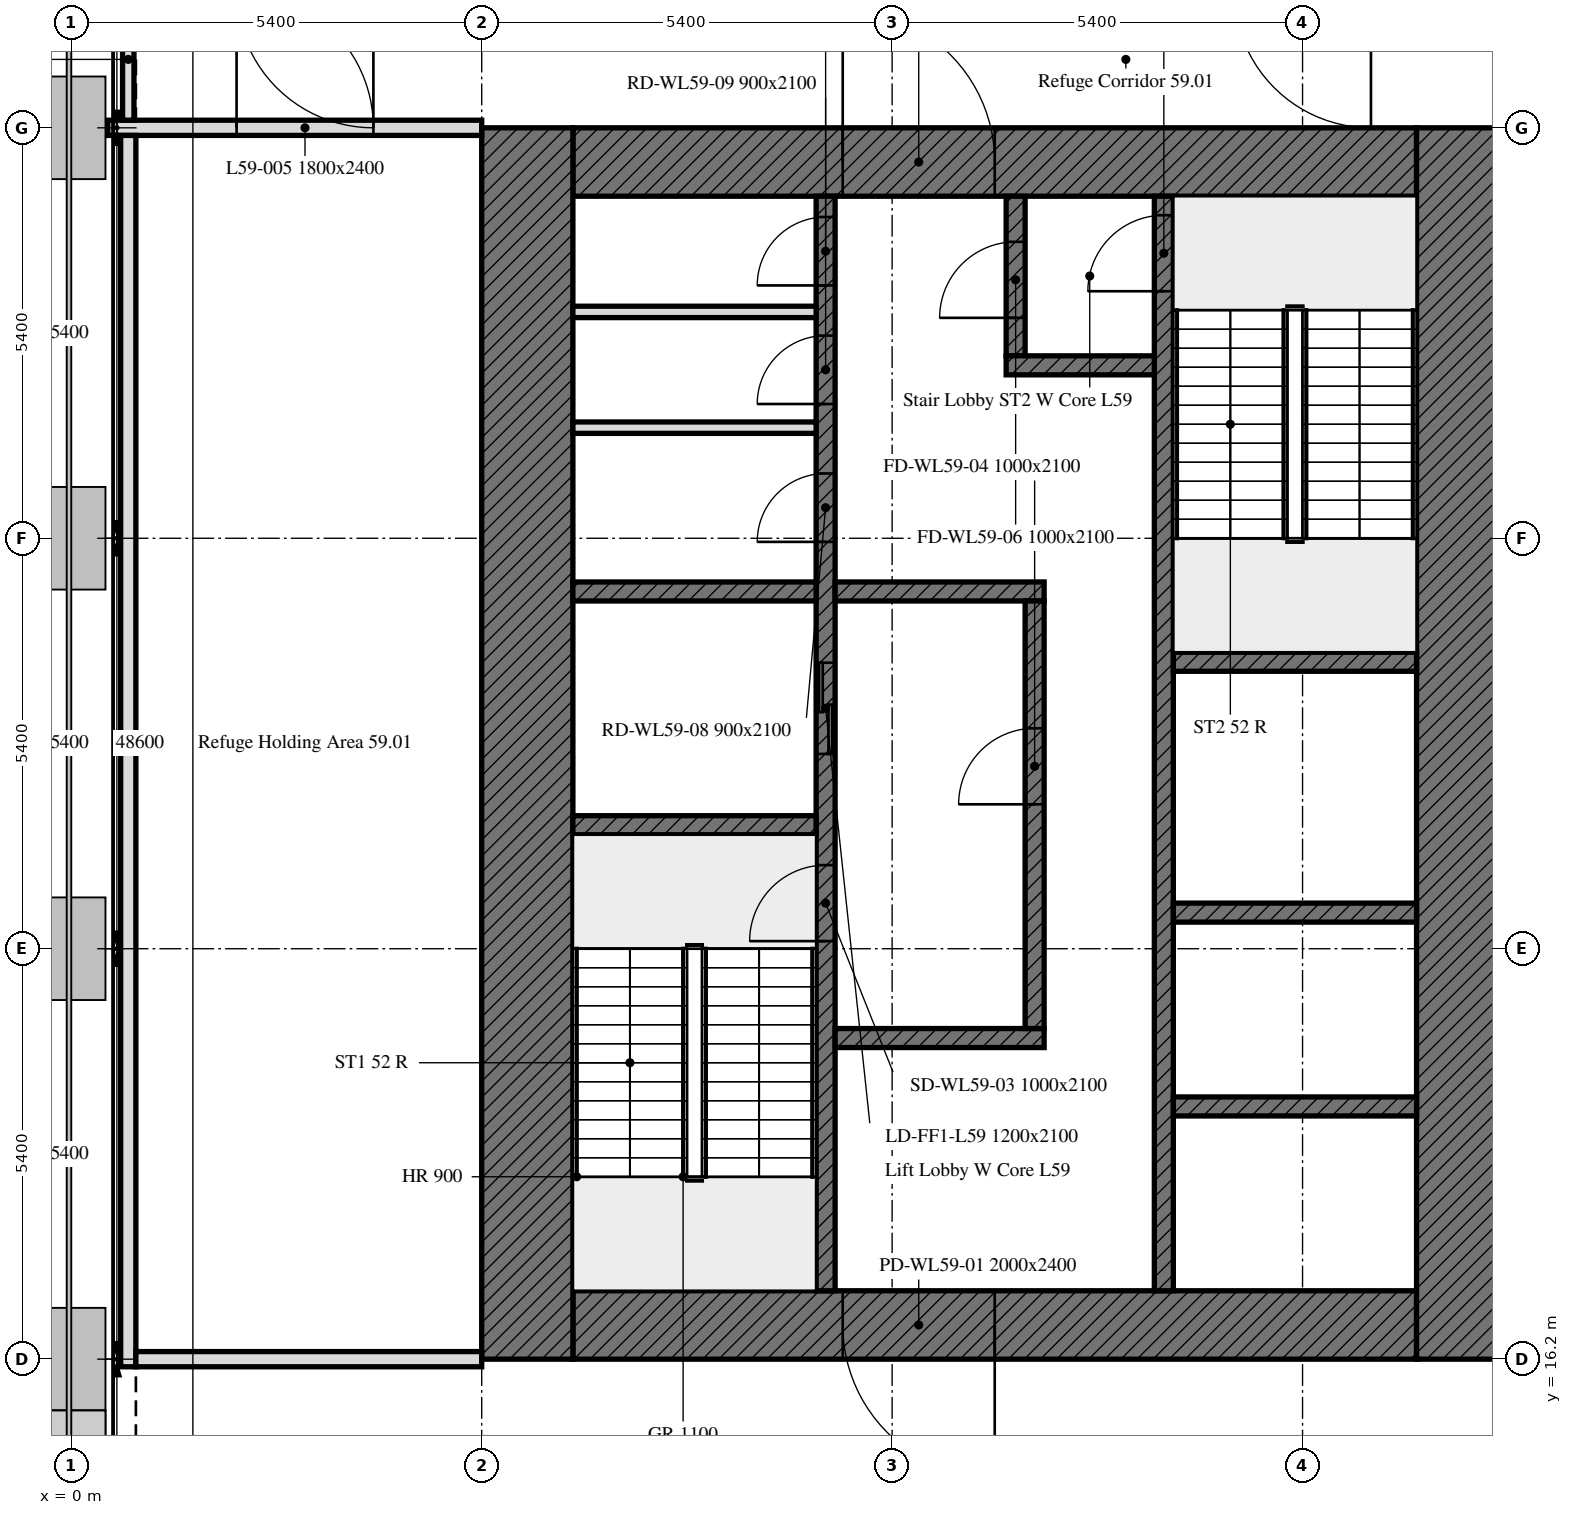
"""IFC4 building model, lengths in metres.
Left out: names, types, materials, properties, quantities, classifications, styles, units other than length and angle.
Written with IfcOpenShell. Run it as: python <this file> out.ifc"""

import sys

from ifc_helpers import new_model, si_unit, direction, frame, frame_2d, origin, place, context, subcontext, project, spatial, rectangle, extrude, element, fill, save


model = new_model("IFC4")
c1 = context("Model", 3, precision=1e-05, world=origin(), true_north=direction((0.0, 1.0)))
c2 = subcontext(c1, "Body", "Model", "MODEL_VIEW")
j1 = project(units=[si_unit("LENGTHUNIT", "METRE"), si_unit("PLANEANGLEUNIT", "RADIAN")], contexts=[c1])
p1 = place(None, origin())
s1 = spatial("IfcSite", under=j1, at=p1, CompositionType="ELEMENT")
p2 = place(p1, origin())
s2 = spatial("IfcBuilding", under=s1, at=p2, CompositionType="ELEMENT")
p3 = place(p2, frame((0.0, 0.0, 233.5)))
s3 = spatial("IfcBuildingStorey", under=s2, at=p3, CompositionType="ELEMENT", Elevation=233.5)
p4 = place(p3, frame((17.7, 16.65, 0.0), z_axis=(0.0, 0.0, 1.0), x_axis=(-1.0, 0.0, 0.0)))
e1 = element("IfcWall", 1, at=p4, inside=s3, PredefinedType="SOLIDWALL", context=c2, shape_type="SweptSolid", body=[
    extrude(rectangle(XDim=11.1, YDim=0.9, at=frame_2d((5.55, 0.0))), origin(), (0.0, 0.0, 1.0), 9.3),
])
p5 = place(p4, frame((5.55, 0.0, 0.0)))
e2 = element("IfcOpeningElement", 2, at=p5, cuts=e1, PredefinedType="OPENING", context=c2, shape_type="SweptSolid", body=[
    extrude(rectangle(XDim=2.0, YDim=2.4, at=frame_2d((1.0, 1.2))), frame((0.0, 0.45, 0.0), z_axis=(0.0, -1.0, 0.0), x_axis=(1.0, 0.0, 0.0)), (0.0, 0.0, 1.0), 0.9),
])
p6 = place(p3, frame((6.6, 31.95, 0.0), z_axis=(0.0, 0.0, 1.0), x_axis=(1.0, 0.0, 0.0)))
e3 = element("IfcWall", 3, at=p6, inside=s3, PredefinedType="SOLIDWALL", context=c2, shape_type="SweptSolid", body=[
    extrude(rectangle(XDim=11.1, YDim=0.9, at=frame_2d((5.55, 0.0))), origin(), (0.0, 0.0, 1.0), 9.3),
])
p7 = place(p6, frame((3.55, 0.0, 0.0)))
e4 = element("IfcOpeningElement", 4, at=p7, cuts=e3, PredefinedType="OPENING", context=c2, shape_type="SweptSolid", body=[
    extrude(rectangle(XDim=2.0, YDim=2.4, at=frame_2d((1.0, 1.2))), frame((0.0, 0.45, 0.0), z_axis=(0.0, -1.0, 0.0), x_axis=(1.0, 0.0, 0.0)), (0.0, 0.0, 1.0), 0.9),
])
for number, where, z_axis, x_axis in (
    (5, (6.0, 16.2, 0.0), (0.0, 0.0, 1.0), (0.0, 1.0, 0.0)),
    (6, (18.3, 32.4, 0.0), (0.0, 0.0, 1.0), (0.0, -1.0, 0.0)),
):
    element("IfcWall", number, at=place(p3, frame(where, z_axis=z_axis, x_axis=x_axis)), inside=s3, PredefinedType="SOLIDWALL", context=c2, shape_type="SweptSolid", body=[
        extrude(rectangle(XDim=16.2, YDim=1.2, at=frame_2d((8.1, 0.0))), origin(), (0.0, 0.0, 1.0), 9.3),
    ])
p8 = place(p3, frame((9.925, 17.1, 0.0), z_axis=(0.0, 0.0, 1.0), x_axis=(0.0, 1.0, 0.0)))
e7 = element("IfcWall", 7, at=p8, inside=s3, PredefinedType="SOLIDWALL", context=c2, shape_type="SweptSolid", body=[
    extrude(rectangle(XDim=14.4, YDim=0.25, at=frame_2d((7.2, 0.0))), origin(), (0.0, 0.0, 1.0), 9.3),
])
p9 = place(p8, frame((4.6, 0.0, 0.0)))
e8 = element("IfcOpeningElement", 8, at=p9, cuts=e7, PredefinedType="OPENING", context=c2, shape_type="SweptSolid", body=[
    extrude(rectangle(XDim=1.0, YDim=2.1, at=frame_2d((0.5, 1.05))), frame((0.0, 0.125, 0.0), z_axis=(0.0, -1.0, 0.0), x_axis=(1.0, 0.0, 0.0)), (0.0, 0.0, 1.0), 0.25),
])
p10 = place(p8, frame((7.062, 0.0, 0.0)))
e9 = element("IfcOpeningElement", 9, at=p10, cuts=e7, PredefinedType="OPENING", context=c2, shape_type="SweptSolid", body=[
    extrude(rectangle(XDim=1.2, YDim=2.1, at=frame_2d((0.6, 1.05))), frame((0.0, 0.125, 0.0), z_axis=(0.0, -1.0, 0.0), x_axis=(1.0, 0.0, 0.0)), (0.0, 0.0, 1.0), 0.25),
])
p11 = place(p8, frame((9.853, 0.0, 0.0)))
e10 = element("IfcOpeningElement", 10, at=p11, cuts=e7, PredefinedType="OPENING", context=c2, shape_type="SweptSolid", body=[
    extrude(rectangle(XDim=0.9, YDim=2.1, at=frame_2d((0.45, 1.05))), frame((0.0, 0.125, 0.0), z_axis=(0.0, -1.0, 0.0), x_axis=(1.0, 0.0, 0.0)), (0.0, 0.0, 1.0), 0.25),
])
p12 = place(p8, frame((11.667, 0.0, 0.0)))
e11 = element("IfcOpeningElement", 11, at=p12, cuts=e7, PredefinedType="OPENING", context=c2, shape_type="SweptSolid", body=[
    extrude(rectangle(XDim=0.9, YDim=2.1, at=frame_2d((0.45, 1.05))), frame((0.0, 0.125, 0.0), z_axis=(0.0, -1.0, 0.0), x_axis=(1.0, 0.0, 0.0)), (0.0, 0.0, 1.0), 0.25),
])
p13 = place(p8, frame((13.227, 0.0, 0.0)))
e12 = element("IfcOpeningElement", 12, at=p13, cuts=e7, PredefinedType="OPENING", context=c2, shape_type="SweptSolid", body=[
    extrude(rectangle(XDim=0.9, YDim=2.1, at=frame_2d((0.45, 1.05))), frame((0.0, 0.125, 0.0), z_axis=(0.0, -1.0, 0.0), x_axis=(1.0, 0.0, 0.0)), (0.0, 0.0, 1.0), 0.25),
])
p14 = place(p3, frame((14.375, 17.1, 0.0), z_axis=(0.0, 0.0, 1.0), x_axis=(0.0, 1.0, 0.0)))
e13 = element("IfcWall", 13, at=p14, inside=s3, PredefinedType="SOLIDWALL", context=c2, shape_type="SweptSolid", body=[
    extrude(rectangle(XDim=14.4, YDim=0.25, at=frame_2d((7.2, 0.0))), origin(), (0.0, 0.0, 1.0), 9.3),
])
p15 = place(p14, frame((13.15, 0.0, 0.0)))
e14 = element("IfcOpeningElement", 14, at=p15, cuts=e13, PredefinedType="OPENING", context=c2, shape_type="SweptSolid", body=[
    extrude(rectangle(XDim=1.0, YDim=2.1, at=frame_2d((0.5, 1.05))), frame((0.0, 0.125, 0.0), z_axis=(0.0, -1.0, 0.0), x_axis=(1.0, 0.0, 0.0)), (0.0, 0.0, 1.0), 0.25),
])
for number, where, z_axis, x_axis in (
    (15, (6.6, 23.225, 0.0), (0.0, 0.0, 1.0), (1.0, 0.0, 0.0)),
    (16, (14.5, 25.375, 0.0), (0.0, 0.0, 1.0), (1.0, 0.0, 0.0)),
    (17, (14.5, 22.075, 0.0), (0.0, 0.0, 1.0), (1.0, 0.0, 0.0)),
    (18, (6.6, 26.3, 0.0), (0.0, 0.0, 1.0), (1.0, 0.0, 0.0)),
):
    element("IfcWall", number, at=place(p3, frame(where, z_axis=z_axis, x_axis=x_axis)), inside=s3, PredefinedType="SOLIDWALL", context=c2, shape_type="SweptSolid", body=[
        extrude(rectangle(XDim=3.2, YDim=0.25, at=frame_2d((1.6, 0.0))), origin(), (0.0, 0.0, 1.0), 9.3),
    ])
for number, where, z_axis, x_axis in (
    (19, (10.05, 26.3, 0.0), (0.0, 0.0, 1.0), (1.0, 0.0, 0.0)),
    (20, (10.05, 20.425, 0.0), (0.0, 0.0, 1.0), (1.0, 0.0, 0.0)),
):
    element("IfcWall", number, at=place(p3, frame(where, z_axis=z_axis, x_axis=x_axis)), inside=s3, PredefinedType="SOLIDWALL", context=c2, shape_type="SweptSolid", body=[
        extrude(rectangle(XDim=2.75, YDim=0.25, at=frame_2d((1.375, 0.0))), origin(), (0.0, 0.0, 1.0), 9.3),
    ])
p16 = place(p3, frame((12.425, 29.4, 0.0), z_axis=(0.0, 0.0, 1.0), x_axis=(0.0, 1.0, 0.0)))
e21 = element("IfcWall", 21, at=p16, inside=s3, PredefinedType="SOLIDWALL", context=c2, shape_type="SweptSolid", body=[
    extrude(rectangle(XDim=2.1, YDim=0.25, at=frame_2d((1.05, 0.0))), origin(), (0.0, 0.0, 1.0), 9.3),
])
p17 = place(p16, frame((0.5, 0.0, 0.0)))
e22 = element("IfcOpeningElement", 22, at=p17, cuts=e21, PredefinedType="OPENING", context=c2, shape_type="SweptSolid", body=[
    extrude(rectangle(XDim=1.0, YDim=2.1, at=frame_2d((0.5, 1.05))), frame((0.0, 0.125, 0.0), z_axis=(0.0, -1.0, 0.0), x_axis=(1.0, 0.0, 0.0)), (0.0, 0.0, 1.0), 0.25),
])
p18 = place(p3, frame((12.3, 29.275, 0.0), z_axis=(0.0, 0.0, 1.0), x_axis=(1.0, 0.0, 0.0)))
e23 = element("IfcWall", 23, at=p18, inside=s3, PredefinedType="SOLIDWALL", context=c2, shape_type="SweptSolid", body=[
    extrude(rectangle(XDim=1.95, YDim=0.25, at=frame_2d((0.975, 0.0))), origin(), (0.0, 0.0, 1.0), 9.3),
])
p19 = place(p3, frame((12.675, 20.55, 0.0), z_axis=(0.0, 0.0, 1.0), x_axis=(0.0, 1.0, 0.0)))
e24 = element("IfcWall", 24, at=p19, inside=s3, PredefinedType="SOLIDWALL", context=c2, shape_type="SweptSolid", body=[
    extrude(rectangle(XDim=5.625, YDim=0.25, at=frame_2d((2.812, 0.0))), origin(), (0.0, 0.0, 1.0), 9.3),
])
p20 = place(p19, frame((2.95, 0.0, 0.0)))
e25 = element("IfcOpeningElement", 25, at=p20, cuts=e24, PredefinedType="OPENING", context=c2, shape_type="SweptSolid", body=[
    extrude(rectangle(XDim=1.0, YDim=2.1, at=frame_2d((0.5, 1.05))), frame((0.0, 0.125, 0.0), z_axis=(0.0, -1.0, 0.0), x_axis=(1.0, 0.0, 0.0)), (0.0, 0.0, 1.0), 0.25),
])
p21 = place(p3, frame((14.5, 19.525, 0.0), z_axis=(0.0, 0.0, 1.0), x_axis=(1.0, 0.0, 0.0)))
e26 = element("IfcWall", 26, at=p21, inside=s3, PredefinedType="SOLIDWALL", context=c2, shape_type="SweptSolid", body=[
    extrude(rectangle(XDim=3.2, YDim=0.25, at=frame_2d((1.6, 0.0))), origin(), (0.0, 0.0, 1.0), 9.3),
])
for number, where, z_axis, x_axis in (
    (27, (6.6, 28.455, 0.0), (0.0, 0.0, 1.0), (1.0, 0.0, 0.0)),
    (28, (6.6, 29.978, 0.0), (0.0, 0.0, 1.0), (1.0, 0.0, 0.0)),
):
    element("IfcWall", number, at=place(p3, frame(where, z_axis=z_axis, x_axis=x_axis)), inside=s3, PredefinedType="PARTITIONING", context=c2, shape_type="SweptSolid", body=[
        extrude(rectangle(XDim=3.2, YDim=0.15, at=frame_2d((1.6, 0.0))), origin(), (0.0, 0.0, 1.0), 9.3),
    ])
p22 = place(p3, frame((0.48, 32.4, 0.0), z_axis=(0.0, 0.0, 1.0), x_axis=(1.0, 0.0, 0.0)))
e29 = element("IfcWall", 29, at=p22, inside=s3, PredefinedType="PARTITIONING", context=c2, shape_type="SweptSolid", body=[
    extrude(rectangle(XDim=4.92, YDim=0.2, at=frame_2d((2.46, 0.0))), origin(), (0.0, 0.0, 1.0), 8.55),
])
p23 = place(p22, frame((1.695, 0.0, 0.0)))
e30 = element("IfcOpeningElement", 30, at=p23, cuts=e29, PredefinedType="OPENING", context=c2, shape_type="SweptSolid", body=[
    extrude(rectangle(XDim=1.8, YDim=2.4, at=frame_2d((0.9, 1.2))), frame((0.0, 0.1, 0.0), z_axis=(0.0, -1.0, 0.0), x_axis=(1.0, 0.0, 0.0)), (0.0, 0.0, 1.0), 0.2),
])
p24 = place(p3, frame((0.75, 34.1, 0.0), z_axis=(0.0, 0.0, 1.0), x_axis=(0.0, -1.0, 0.0)))
e31 = element("IfcWall", 31, at=p24, inside=s3, PredefinedType="PARTITIONING", context=c2, shape_type="SweptSolid", body=[
    extrude(rectangle(XDim=1.6, YDim=0.15, at=frame_2d((0.8, 0.0))), origin(), (0.0, 0.0, 1.0), 9.3),
])
p25 = place(p3, frame((0.75, 32.3, 0.0), z_axis=(0.0, 0.0, 1.0), x_axis=(0.0, -1.0, 0.0)))
e32 = element("IfcWall", 32, at=p25, inside=s3, PredefinedType="PARTITIONING", context=c2, shape_type="SweptSolid", body=[
    extrude(rectangle(XDim=16.2, YDim=0.2, at=frame_2d((8.1, 0.0))), origin(), (0.0, 0.0, 1.0), 9.3),
])
p26 = place(p3, frame((0.85, 16.2, 0.0), z_axis=(0.0, 0.0, 1.0), x_axis=(1.0, 0.0, 0.0)))
e33 = element("IfcWall", 33, at=p26, inside=s3, PredefinedType="PARTITIONING", context=c2, shape_type="SweptSolid", body=[
    extrude(rectangle(XDim=4.55, YDim=0.2, at=frame_2d((2.275, 0.0))), origin(), (0.0, 0.0, 1.0), 8.55),
])
p27 = place(p5, origin())
e34 = element("IfcDoor", 34, at=p27, inside=s3, OperationType="DOUBLE_DOOR_SINGLE_SWING", PredefinedType="DOOR", context=c2, shape_type="SweptSolid", body=[
    extrude(rectangle(XDim=2.0, YDim=2.4, at=frame_2d((1.0, 1.2))), frame((0.0, 0.025, 0.0), z_axis=(0.0, -1.0, 0.0), x_axis=(1.0, 0.0, 0.0)), (0.0, 0.0, 1.0), 0.05),
])
fill(e2, e34)
p28 = place(p7, origin())
e35 = element("IfcDoor", 35, at=p28, inside=s3, OperationType="DOUBLE_DOOR_SINGLE_SWING", PredefinedType="DOOR", context=c2, shape_type="SweptSolid", body=[
    extrude(rectangle(XDim=2.0, YDim=2.4, at=frame_2d((1.0, 1.2))), frame((0.0, 0.025, 0.0), z_axis=(0.0, -1.0, 0.0), x_axis=(1.0, 0.0, 0.0)), (0.0, 0.0, 1.0), 0.05),
])
fill(e4, e35)
p29 = place(p9, origin())
e36 = element("IfcDoor", 36, at=p29, inside=s3, OperationType="SINGLE_SWING_LEFT", PredefinedType="DOOR", context=c2, shape_type="SweptSolid", body=[
    extrude(rectangle(XDim=1.0, YDim=2.1, at=frame_2d((0.5, 1.05))), frame((0.0, 0.025, 0.0), z_axis=(0.0, -1.0, 0.0), x_axis=(1.0, 0.0, 0.0)), (0.0, 0.0, 1.0), 0.05),
])
fill(e8, e36)
p30 = place(p20, origin())
e37 = element("IfcDoor", 37, at=p30, inside=s3, OperationType="SINGLE_SWING_LEFT", PredefinedType="DOOR", context=c2, shape_type="SweptSolid", body=[
    extrude(rectangle(XDim=1.0, YDim=2.1, at=frame_2d((0.5, 1.05))), frame((0.0, 0.025, 0.0), z_axis=(0.0, -1.0, 0.0), x_axis=(1.0, 0.0, 0.0)), (0.0, 0.0, 1.0), 0.05),
])
fill(e25, e37)
p31 = place(p15, origin())
e38 = element("IfcDoor", 38, at=p31, inside=s3, OperationType="SINGLE_SWING_LEFT", PredefinedType="DOOR", context=c2, shape_type="SweptSolid", body=[
    extrude(rectangle(XDim=1.0, YDim=2.1, at=frame_2d((0.5, 1.05))), frame((0.0, 0.025, 0.0), z_axis=(0.0, -1.0, 0.0), x_axis=(1.0, 0.0, 0.0)), (0.0, 0.0, 1.0), 0.05),
])
fill(e14, e38)
p32 = place(p17, origin())
e39 = element("IfcDoor", 39, at=p32, inside=s3, OperationType="SINGLE_SWING_LEFT", PredefinedType="DOOR", context=c2, shape_type="SweptSolid", body=[
    extrude(rectangle(XDim=1.0, YDim=2.1, at=frame_2d((0.5, 1.05))), frame((0.0, 0.025, 0.0), z_axis=(0.0, -1.0, 0.0), x_axis=(1.0, 0.0, 0.0)), (0.0, 0.0, 1.0), 0.05),
])
fill(e22, e39)
p33 = place(p10, origin())
e40 = element("IfcDoor", 40, at=p33, inside=s3, OperationType="DOUBLE_DOOR_SLIDING", PredefinedType="DOOR", context=c2, shape_type="SweptSolid", body=[
    extrude(rectangle(XDim=1.2, YDim=2.1, at=frame_2d((0.6, 1.05))), frame((0.0, 0.025, 0.0), z_axis=(0.0, -1.0, 0.0), x_axis=(1.0, 0.0, 0.0)), (0.0, 0.0, 1.0), 0.05),
])
fill(e9, e40)
p34 = place(p11, origin())
e41 = element("IfcDoor", 41, at=p34, inside=s3, OperationType="SINGLE_SWING_LEFT", PredefinedType="DOOR", context=c2, shape_type="SweptSolid", body=[
    extrude(rectangle(XDim=0.9, YDim=2.1, at=frame_2d((0.45, 1.05))), frame((0.0, 0.025, 0.0), z_axis=(0.0, -1.0, 0.0), x_axis=(1.0, 0.0, 0.0)), (0.0, 0.0, 1.0), 0.05),
])
fill(e10, e41)
p35 = place(p12, origin())
e42 = element("IfcDoor", 42, at=p35, inside=s3, OperationType="SINGLE_SWING_LEFT", PredefinedType="DOOR", context=c2, shape_type="SweptSolid", body=[
    extrude(rectangle(XDim=0.9, YDim=2.1, at=frame_2d((0.45, 1.05))), frame((0.0, 0.025, 0.0), z_axis=(0.0, -1.0, 0.0), x_axis=(1.0, 0.0, 0.0)), (0.0, 0.0, 1.0), 0.05),
])
fill(e11, e42)
p36 = place(p13, origin())
e43 = element("IfcDoor", 43, at=p36, inside=s3, OperationType="SINGLE_SWING_LEFT", PredefinedType="DOOR", context=c2, shape_type="SweptSolid", body=[
    extrude(rectangle(XDim=0.9, YDim=2.1, at=frame_2d((0.45, 1.05))), frame((0.0, 0.025, 0.0), z_axis=(0.0, -1.0, 0.0), x_axis=(1.0, 0.0, 0.0)), (0.0, 0.0, 1.0), 0.05),
])
fill(e12, e43)
p37 = place(p23, origin())
e44 = element("IfcDoor", 44, at=p37, inside=s3, OperationType="DOUBLE_DOOR_SINGLE_SWING", PredefinedType="DOOR", context=c2, shape_type="SweptSolid", body=[
    extrude(rectangle(XDim=1.8, YDim=2.4, at=frame_2d((0.9, 1.2))), frame((0.0, 0.025, 0.0), z_axis=(0.0, -1.0, 0.0), x_axis=(1.0, 0.0, 0.0)), (0.0, 0.0, 1.0), 0.05),
])
fill(e30, e44)
save(model, sys.argv[1])
